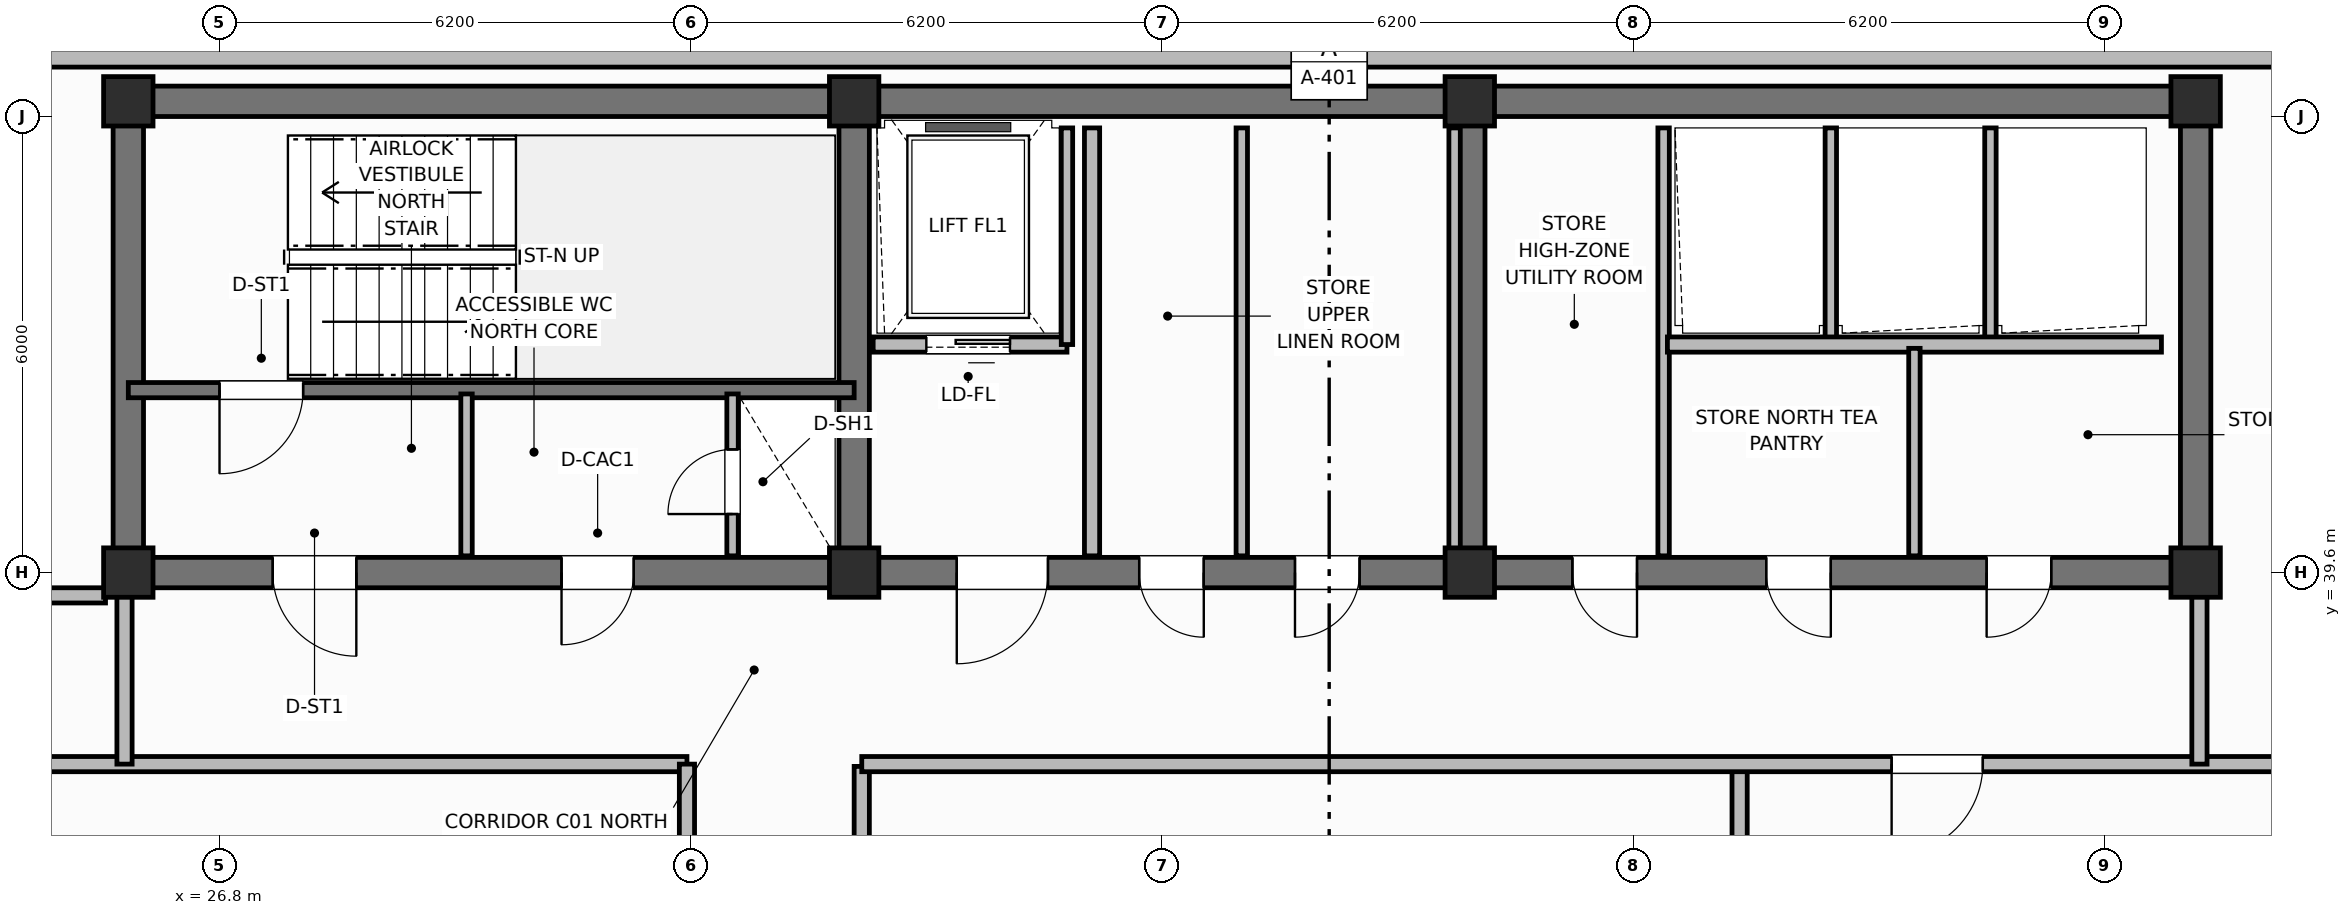
"""IFC4 building model, lengths in metres.
Left out: names, types, materials, properties, quantities, classifications, styles, units other than length and angle.
Written with IfcOpenShell. Run it as: python <this file> out.ifc"""

import sys

from ifc_helpers import new_model, si_unit, direction, frame, frame_2d, origin, origin_2d, place, context, subcontext, project, spatial, rectangle, extrude, element, fill, save


model = new_model("IFC4")
c1 = context("Model", 3, precision=1e-05, world=origin(), true_north=direction((0.0, 1.0)))
c2 = subcontext(c1, "Body", "Model", "MODEL_VIEW")
j1 = project(units=[si_unit("LENGTHUNIT", "METRE"), si_unit("PLANEANGLEUNIT", "RADIAN")], contexts=[c1])
p1 = place(None, origin())
s1 = spatial("IfcSite", under=j1, at=p1, CompositionType="ELEMENT")
p2 = place(p1, origin())
s2 = spatial("IfcBuilding", under=s1, at=p2, CompositionType="ELEMENT")
p3 = place(p2, frame((0.0, 0.0, 302.0)))
s3 = spatial("IfcBuildingStorey", under=s2, at=p3, CompositionType="ELEMENT", Elevation=302.0)
p4 = place(p3, frame((25.6, 45.8, 0.0), z_axis=(0.0, 0.0, 1.0), x_axis=(1.0, 0.0, 0.0)))
e1 = element("IfcWall", 1, at=p4, inside=s3, PredefinedType="SHEAR", context=c2, shape_type="SweptSolid", body=[
    extrude(rectangle(XDim=27.2, YDim=0.4, at=frame_2d((13.6, 0.0))), origin(), (0.0, 0.0, 1.0), 3.6),
])
for number, where, z_axis, x_axis in (
    (2, (25.6, 39.8, 0.0), (0.0, 0.0, 1.0), (0.0, 1.0, 0.0)),
    (3, (52.8, 39.8, 0.0), (0.0, 0.0, 1.0), (0.0, 1.0, 0.0)),
):
    element("IfcWall", number, at=place(p3, frame(where, z_axis=z_axis, x_axis=x_axis)), inside=s3, PredefinedType="SHEAR", context=c2, shape_type="SweptSolid", body=[
        extrude(rectangle(XDim=5.8, YDim=0.4, at=frame_2d((2.9, 0.0))), origin(), (0.0, 0.0, 1.0), 3.6),
    ])
p5 = place(p3, frame((52.8, 39.6, 0.0), z_axis=(0.0, 0.0, 1.0), x_axis=(-1.0, 0.0, 0.0)))
e4 = element("IfcWall", 4, at=p5, inside=s3, PredefinedType="SHEAR", context=c2, shape_type="SweptSolid", body=[
    extrude(rectangle(XDim=27.2, YDim=0.4, at=frame_2d((13.6, 0.0))), origin(), (0.0, 0.0, 1.0), 3.6),
])
p6 = place(p5, frame((24.2, 0.0, 0.0)))
e5 = element("IfcOpeningElement", 5, at=p6, cuts=e4, PredefinedType="OPENING", context=c2, shape_type="SweptSolid", body=[
    extrude(rectangle(XDim=1.1, YDim=2.15, at=frame_2d((0.55, 1.075))), frame((0.0, 0.21, 0.0), z_axis=(0.0, -1.0, 0.0), x_axis=(1.0, 0.0, 0.0)), (0.0, 0.0, 1.0), 0.42),
])
p7 = place(p5, frame((20.55, 0.0, 0.0)))
e6 = element("IfcOpeningElement", 6, at=p7, cuts=e4, PredefinedType="OPENING", context=c2, shape_type="SweptSolid", body=[
    extrude(rectangle(XDim=0.95, YDim=2.1, at=frame_2d((0.475, 1.05))), frame((0.0, 0.21, 0.0), z_axis=(0.0, -1.0, 0.0), x_axis=(1.0, 0.0, 0.0)), (0.0, 0.0, 1.0), 0.42),
])
p8 = place(p5, frame((15.1, 0.0, 0.0)))
e7 = element("IfcOpeningElement", 7, at=p8, cuts=e4, PredefinedType="OPENING", context=c2, shape_type="SweptSolid", body=[
    extrude(rectangle(XDim=1.2, YDim=2.15, at=frame_2d((0.6, 1.075))), frame((0.0, 0.21, 0.0), z_axis=(0.0, -1.0, 0.0), x_axis=(1.0, 0.0, 0.0)), (0.0, 0.0, 1.0), 0.42),
])
p9 = place(p5, frame((13.05, 0.0, 0.0)))
e8 = element("IfcOpeningElement", 8, at=p9, cuts=e4, PredefinedType="OPENING", context=c2, shape_type="SweptSolid", body=[
    extrude(rectangle(XDim=0.85, YDim=2.1, at=frame_2d((0.425, 1.05))), frame((0.0, 0.21, 0.0), z_axis=(0.0, -1.0, 0.0), x_axis=(1.0, 0.0, 0.0)), (0.0, 0.0, 1.0), 0.42),
])
p10 = place(p5, frame((11.0, 0.0, 0.0)))
e9 = element("IfcOpeningElement", 9, at=p10, cuts=e4, PredefinedType="OPENING", context=c2, shape_type="SweptSolid", body=[
    extrude(rectangle(XDim=0.85, YDim=2.1, at=frame_2d((0.425, 1.05))), frame((0.0, 0.21, 0.0), z_axis=(0.0, -1.0, 0.0), x_axis=(1.0, 0.0, 0.0)), (0.0, 0.0, 1.0), 0.42),
])
p11 = place(p5, frame((7.35, 0.0, 0.0)))
e10 = element("IfcOpeningElement", 10, at=p11, cuts=e4, PredefinedType="OPENING", context=c2, shape_type="SweptSolid", body=[
    extrude(rectangle(XDim=0.85, YDim=2.1, at=frame_2d((0.425, 1.05))), frame((0.0, 0.21, 0.0), z_axis=(0.0, -1.0, 0.0), x_axis=(1.0, 0.0, 0.0)), (0.0, 0.0, 1.0), 0.42),
])
p12 = place(p5, frame((4.8, 0.0, 0.0)))
e11 = element("IfcOpeningElement", 11, at=p12, cuts=e4, PredefinedType="OPENING", context=c2, shape_type="SweptSolid", body=[
    extrude(rectangle(XDim=0.85, YDim=2.1, at=frame_2d((0.425, 1.05))), frame((0.0, 0.21, 0.0), z_axis=(0.0, -1.0, 0.0), x_axis=(1.0, 0.0, 0.0)), (0.0, 0.0, 1.0), 0.42),
])
p13 = place(p5, frame((1.9, 0.0, 0.0)))
e12 = element("IfcOpeningElement", 12, at=p13, cuts=e4, PredefinedType="OPENING", context=c2, shape_type="SweptSolid", body=[
    extrude(rectangle(XDim=0.85, YDim=2.1, at=frame_2d((0.425, 1.05))), frame((0.0, 0.21, 0.0), z_axis=(0.0, -1.0, 0.0), x_axis=(1.0, 0.0, 0.0)), (0.0, 0.0, 1.0), 0.42),
])
for number, where, z_axis, x_axis in (
    (13, (35.15, 39.8, 0.0), (0.0, 0.0, 1.0), (0.0, 1.0, 0.0)),
    (14, (43.25, 39.8, 0.0), (0.0, 0.0, 1.0), (0.0, 1.0, 0.0)),
):
    element("IfcWall", number, at=place(p3, frame(where, z_axis=z_axis, x_axis=x_axis)), inside=s3, PredefinedType="SHEAR", context=c2, shape_type="SweptSolid", body=[
        extrude(rectangle(XDim=5.8, YDim=0.4, at=frame_2d((2.9, 0.0))), origin(), (0.0, 0.0, 1.0), 3.6),
    ])
for number, where, z_axis, x_axis in (
    (15, (25.6, 39.6, 0.0), (0.0, 0.0, 1.0), (1.0, 0.0, 0.0)),
    (16, (25.6, 45.8, 0.0), (0.0, 0.0, 1.0), (1.0, 0.0, 0.0)),
    (17, (35.15, 39.6, 0.0), (0.0, 0.0, 1.0), (1.0, 0.0, 0.0)),
    (18, (35.15, 45.8, 0.0), (0.0, 0.0, 1.0), (1.0, 0.0, 0.0)),
    (19, (43.25, 39.6, 0.0), (0.0, 0.0, 1.0), (1.0, 0.0, 0.0)),
    (20, (43.25, 45.8, 0.0), (0.0, 0.0, 1.0), (1.0, 0.0, 0.0)),
    (21, (52.8, 39.6, 0.0), (0.0, 0.0, 1.0), (1.0, 0.0, 0.0)),
    (22, (52.8, 45.8, 0.0), (0.0, 0.0, 1.0), (1.0, 0.0, 0.0)),
):
    element("IfcColumn", number, at=place(p3, frame(where, z_axis=z_axis, x_axis=x_axis)), inside=s3, PredefinedType="COLUMN", context=c2, shape_type="SweptSolid", body=[
        extrude(rectangle(XDim=0.65, YDim=0.65, at=origin_2d()), origin(), (0.0, 0.0, 1.0), 3.6),
    ])
p14 = place(p3, frame((54.64, 46.4, 0.0), z_axis=(0.0, 0.0, 1.0), x_axis=(-1.0, 0.0, 0.0)))
e23 = element("IfcWall", 23, at=p14, inside=s3, PredefinedType="SOLIDWALL", context=c2, shape_type="SweptSolid", body=[
    extrude(rectangle(XDim=30.88, YDim=0.3, at=frame_2d((15.44, 0.0))), origin(), (0.0, 0.0, 1.0), 2.84),
])
p15 = place(p3, frame((35.15, 42.0, 0.0), z_axis=(0.0, 0.0, 1.0), x_axis=(-1.0, 0.0, 0.0)))
e24 = element("IfcWall", 24, at=p15, inside=s3, PredefinedType="SHEAR", context=c2, shape_type="SweptSolid", body=[
    extrude(rectangle(XDim=9.55, YDim=0.2, at=frame_2d((4.775, 0.0))), origin(), (0.0, 0.0, 1.0), 3.6),
])
p16 = place(p15, frame((7.25, 0.0, 0.0)))
e25 = element("IfcOpeningElement", 25, at=p16, cuts=e24, PredefinedType="OPENING", context=c2, shape_type="SweptSolid", body=[
    extrude(rectangle(XDim=1.1, YDim=2.15, at=frame_2d((0.55, 1.075))), frame((0.0, 0.11, 0.0), z_axis=(0.0, -1.0, 0.0), x_axis=(1.0, 0.0, 0.0)), (0.0, 0.0, 1.0), 0.22),
])
p17 = place(p3, frame((33.55, 39.82, 0.0), z_axis=(0.0, 0.0, 1.0), x_axis=(0.0, 1.0, 0.0)))
e26 = element("IfcWall", 26, at=p17, inside=s3, PredefinedType="PARTITIONING", context=c2, shape_type="SweptSolid", body=[
    extrude(rectangle(XDim=2.13, YDim=0.15, at=frame_2d((1.065, 0.0))), origin(), (0.0, 0.0, 1.0), 2.54),
])
p18 = place(p17, frame((0.55, 0.0, 0.0)))
e27 = element("IfcOpeningElement", 27, at=p18, cuts=e26, PredefinedType="OPENING", context=c2, shape_type="SweptSolid", body=[
    extrude(rectangle(XDim=0.85, YDim=2.05, at=frame_2d((0.425, 1.025))), frame((0.0, 0.085, 0.0), z_axis=(0.0, -1.0, 0.0), x_axis=(1.0, 0.0, 0.0)), (0.0, 0.0, 1.0), 0.17),
])
p19 = place(p3, frame((30.05, 39.82, 0.0), z_axis=(0.0, 0.0, 1.0), x_axis=(0.0, 1.0, 0.0)))
e28 = element("IfcWall", 28, at=p19, inside=s3, PredefinedType="PARTITIONING", context=c2, shape_type="SweptSolid", body=[
    extrude(rectangle(XDim=2.13, YDim=0.15, at=frame_2d((1.065, 0.0))), origin(), (0.0, 0.0, 1.0), 2.54),
])
p20 = place(p3, frame((37.95, 42.6, 0.0), z_axis=(0.0, 0.0, 1.0), x_axis=(-1.0, 0.0, 0.0)))
e29 = element("IfcWall", 29, at=p20, inside=s3, PredefinedType="PARTITIONING", context=c2, shape_type="SweptSolid", body=[
    extrude(rectangle(XDim=2.55, YDim=0.2, at=frame_2d((1.275, 0.0))), origin(), (0.0, 0.0, 1.0), 2.2),
])
p21 = place(p20, frame((0.75, 0.0, 0.0)))
e30 = element("IfcOpeningElement", 30, at=p21, cuts=e29, PredefinedType="OPENING", context=c2, shape_type="SweptSolid", body=[
    extrude(rectangle(XDim=1.1, YDim=2.15, at=frame_2d((0.55, 1.075))), frame((0.0, 0.11, 0.0), z_axis=(0.0, -1.0, 0.0), x_axis=(1.0, 0.0, 0.0)), (0.0, 0.0, 1.0), 0.22),
])
p22 = place(p3, frame((37.95, 42.6, 0.0), z_axis=(0.0, 0.0, 1.0), x_axis=(0.0, 1.0, 0.0)))
e31 = element("IfcWall", 31, at=p22, inside=s3, PredefinedType="PARTITIONING", context=c2, shape_type="SweptSolid", body=[
    extrude(rectangle(XDim=2.85, YDim=0.15, at=frame_2d((1.425, 0.0))), origin(), (0.0, 0.0, 1.0), 2.54),
])
p23 = place(p3, frame((38.28, 39.82, 0.0), z_axis=(0.0, 0.0, 1.0), x_axis=(0.0, 1.0, 0.0)))
e32 = element("IfcWall", 32, at=p23, inside=s3, PredefinedType="PARTITIONING", context=c2, shape_type="SweptSolid", body=[
    extrude(rectangle(XDim=5.63, YDim=0.2, at=frame_2d((2.815, 0.0))), origin(), (0.0, 0.0, 1.0), 2.54),
])
for number, where, z_axis, x_axis in (
    (33, (43.05, 39.82, 0.0), (0.0, 0.0, 1.0), (0.0, 1.0, 0.0)),
    (34, (40.25, 39.82, 0.0), (0.0, 0.0, 1.0), (0.0, 1.0, 0.0)),
    (35, (45.8, 39.82, 0.0), (0.0, 0.0, 1.0), (0.0, 1.0, 0.0)),
):
    element("IfcWall", number, at=place(p3, frame(where, z_axis=z_axis, x_axis=x_axis)), inside=s3, PredefinedType="PARTITIONING", context=c2, shape_type="SweptSolid", body=[
        extrude(rectangle(XDim=5.63, YDim=0.15, at=frame_2d((2.815, 0.0))), origin(), (0.0, 0.0, 1.0), 2.54),
    ])
for number, where, z_axis, x_axis in (
    (36, (48.0, 42.65, 0.0), (0.0, 0.0, 1.0), (0.0, 1.0, 0.0)),
    (37, (50.1, 42.65, 0.0), (0.0, 0.0, 1.0), (0.0, 1.0, 0.0)),
):
    element("IfcWall", number, at=place(p3, frame(where, z_axis=z_axis, x_axis=x_axis)), inside=s3, PredefinedType="PARTITIONING", context=c2, shape_type="SweptSolid", body=[
        extrude(rectangle(XDim=2.8, YDim=0.15, at=frame_2d((1.4, 0.0))), origin(), (0.0, 0.0, 1.0), 2.54),
    ])
p24 = place(p3, frame((52.35, 42.6, 0.0), z_axis=(0.0, 0.0, 1.0), x_axis=(-1.0, 0.0, 0.0)))
e38 = element("IfcWall", 38, at=p24, inside=s3, PredefinedType="PARTITIONING", context=c2, shape_type="SweptSolid", body=[
    extrude(rectangle(XDim=6.5, YDim=0.2, at=frame_2d((3.25, 0.0))), origin(), (0.0, 0.0, 1.0), 2.54),
])
p25 = place(p3, frame((49.1, 39.82, 0.0), z_axis=(0.0, 0.0, 1.0), x_axis=(0.0, 1.0, 0.0)))
e39 = element("IfcWall", 39, at=p25, inside=s3, PredefinedType="PARTITIONING", context=c2, shape_type="SweptSolid", body=[
    extrude(rectangle(XDim=2.73, YDim=0.15, at=frame_2d((1.365, 0.0))), origin(), (0.0, 0.0, 1.0), 2.54),
])
p26 = place(p3, frame((21.53, 37.08, 0.0), z_axis=(0.0, 0.0, 1.0), x_axis=(1.0, 0.0, 0.0)))
e40 = element("IfcWall", 40, at=p26, inside=s3, PredefinedType="PARTITIONING", context=c2, shape_type="SweptSolid", body=[
    extrude(rectangle(XDim=11.42, YDim=0.2, at=frame_2d((5.71, 0.0))), origin(), (0.0, 0.0, 1.0), 2.54),
])
p27 = place(p3, frame((32.95, 19.32, 0.0), z_axis=(0.0, 0.0, 1.0), x_axis=(0.0, 1.0, 0.0)))
e41 = element("IfcWall", 41, at=p27, inside=s3, PredefinedType="PARTITIONING", context=c2, shape_type="SweptSolid", body=[
    extrude(rectangle(XDim=17.76, YDim=0.2, at=frame_2d((8.88, 0.0))), origin(), (0.0, 0.0, 1.0), 2.54),
])
p28 = place(p27, frame((6.0, 0.0, 0.0)))
e42 = element("IfcOpeningElement", 42, at=p28, cuts=e41, PredefinedType="OPENING", context=c2, shape_type="SweptSolid", body=[
    extrude(rectangle(XDim=1.2, YDim=2.15, at=frame_2d((0.6, 1.075))), frame((0.0, 0.11, 0.0), z_axis=(0.0, -1.0, 0.0), x_axis=(1.0, 0.0, 0.0)), (0.0, 0.0, 1.0), 0.22),
])
p29 = place(p3, frame((35.25, 19.35, 0.0), z_axis=(0.0, 0.0, 1.0), x_axis=(0.0, 1.0, 0.0)))
e43 = element("IfcWall", 43, at=p29, inside=s3, PredefinedType="PARTITIONING", context=c2, shape_type="SweptSolid", body=[
    extrude(rectangle(XDim=17.7, YDim=0.2, at=frame_2d((8.85, 0.0))), origin(), (0.0, 0.0, 1.0), 2.54),
])
p30 = place(p29, frame((6.0, 0.0, 0.0)))
e44 = element("IfcOpeningElement", 44, at=p30, cuts=e43, PredefinedType="OPENING", context=c2, shape_type="SweptSolid", body=[
    extrude(rectangle(XDim=1.2, YDim=2.15, at=frame_2d((0.6, 1.075))), frame((0.0, 0.11, 0.0), z_axis=(0.0, -1.0, 0.0), x_axis=(1.0, 0.0, 0.0)), (0.0, 0.0, 1.0), 0.22),
])
p31 = place(p3, frame((46.8, 19.35, 0.0), z_axis=(0.0, 0.0, 1.0), x_axis=(0.0, 1.0, 0.0)))
e45 = element("IfcWall", 45, at=p31, inside=s3, PredefinedType="PARTITIONING", context=c2, shape_type="SweptSolid", body=[
    extrude(rectangle(XDim=17.7, YDim=0.2, at=frame_2d((8.85, 0.0))), origin(), (0.0, 0.0, 1.0), 2.54),
])
p32 = place(p3, frame((56.87, 37.08, 0.0), z_axis=(0.0, 0.0, 1.0), x_axis=(-1.0, 0.0, 0.0)))
e46 = element("IfcWall", 46, at=p32, inside=s3, PredefinedType="PARTITIONING", context=c2, shape_type="SweptSolid", body=[
    extrude(rectangle(XDim=21.62, YDim=0.2, at=frame_2d((10.81, 0.0))), origin(), (0.0, 0.0, 1.0), 2.54),
])
p33 = place(p32, frame((6.87, 0.0, 0.0)))
e47 = element("IfcOpeningElement", 47, at=p33, cuts=e46, PredefinedType="OPENING", context=c2, shape_type="SweptSolid", body=[
    extrude(rectangle(XDim=1.2, YDim=2.15, at=frame_2d((0.6, 1.075))), frame((0.0, 0.11, 0.0), z_axis=(0.0, -1.0, 0.0), x_axis=(1.0, 0.0, 0.0)), (0.0, 0.0, 1.0), 0.22),
])
for number, where, z_axis, x_axis in (
    (48, (52.85, 37.08, 0.0), (0.0, 0.0, 1.0), (0.0, 1.0, 0.0)),
    (49, (25.55, 37.08, 0.0), (0.0, 0.0, 1.0), (0.0, 1.0, 0.0)),
):
    element("IfcWall", number, at=place(p3, frame(where, z_axis=z_axis, x_axis=x_axis)), inside=s3, PredefinedType="PARTITIONING", context=c2, shape_type="SweptSolid", body=[
        extrude(rectangle(XDim=2.37, YDim=0.2, at=frame_2d((1.185, 0.0))), origin(), (0.0, 0.0, 1.0), 2.54),
    ])
p34 = place(p3, frame((21.53, 39.3, 0.0), z_axis=(0.0, 0.0, 1.0), x_axis=(1.0, 0.0, 0.0)))
e50 = element("IfcWall", 50, at=p34, inside=s3, PredefinedType="PARTITIONING", context=c2, shape_type="SweptSolid", body=[
    extrude(rectangle(XDim=3.77, YDim=0.2, at=frame_2d((1.885, 0.0))), origin(), (0.0, 0.0, 1.0), 2.54),
])
p35 = place(p16, origin())
e51 = element("IfcDoor", 51, at=p35, inside=s3, OperationType="SINGLE_SWING_RIGHT", PredefinedType="DOOR", context=c2, shape_type="SweptSolid", body=[
    extrude(rectangle(XDim=1.1, YDim=2.15, at=frame_2d((0.55, 1.075))), frame((0.0, 0.025, 0.0), z_axis=(0.0, -1.0, 0.0), x_axis=(1.0, 0.0, 0.0)), (0.0, 0.0, 1.0), 0.05),
])
fill(e25, e51)
p36 = place(p18, origin())
e52 = element("IfcDoor", 52, at=p36, inside=s3, OperationType="SINGLE_SWING_LEFT", PredefinedType="TRAPDOOR", context=c2, shape_type="SweptSolid", body=[
    extrude(rectangle(XDim=0.85, YDim=2.05, at=frame_2d((0.425, 1.025))), frame((0.0, 0.025, 0.0), z_axis=(0.0, -1.0, 0.0), x_axis=(1.0, 0.0, 0.0)), (0.0, 0.0, 1.0), 0.05),
])
fill(e27, e52)
p37 = place(p21, origin())
e53 = element("IfcDoor", 53, at=p37, inside=s3, OperationType="SLIDING_TO_LEFT", PredefinedType="DOOR", context=c2, shape_type="SweptSolid", body=[
    extrude(rectangle(XDim=1.1, YDim=2.15, at=frame_2d((0.55, 1.075))), frame((0.0, 0.025, 0.0), z_axis=(0.0, -1.0, 0.0), x_axis=(1.0, 0.0, 0.0)), (0.0, 0.0, 1.0), 0.05),
])
fill(e30, e53)
p38 = place(p33, origin())
e54 = element("IfcDoor", 54, at=p38, inside=s3, OperationType="SINGLE_SWING_RIGHT", PredefinedType="DOOR", context=c2, shape_type="SweptSolid", body=[
    extrude(rectangle(XDim=1.2, YDim=2.15, at=frame_2d((0.6, 1.075))), frame((0.0, 0.025, 0.0), z_axis=(0.0, -1.0, 0.0), x_axis=(1.0, 0.0, 0.0)), (0.0, 0.0, 1.0), 0.05),
])
fill(e47, e54)
p39 = place(p6, origin())
e55 = element("IfcDoor", 55, at=p39, inside=s3, OperationType="SINGLE_SWING_LEFT", PredefinedType="DOOR", context=c2, shape_type="SweptSolid", body=[
    extrude(rectangle(XDim=1.1, YDim=2.15, at=frame_2d((0.55, 1.075))), frame((0.0, 0.025, 0.0), z_axis=(0.0, -1.0, 0.0), x_axis=(1.0, 0.0, 0.0)), (0.0, 0.0, 1.0), 0.05),
])
fill(e5, e55)
p40 = place(p7, origin())
e56 = element("IfcDoor", 56, at=p40, inside=s3, OperationType="SINGLE_SWING_RIGHT", PredefinedType="DOOR", context=c2, shape_type="SweptSolid", body=[
    extrude(rectangle(XDim=0.95, YDim=2.1, at=frame_2d((0.475, 1.05))), frame((0.0, 0.025, 0.0), z_axis=(0.0, -1.0, 0.0), x_axis=(1.0, 0.0, 0.0)), (0.0, 0.0, 1.0), 0.05),
])
fill(e6, e56)
p41 = place(p8, origin())
e57 = element("IfcDoor", 57, at=p41, inside=s3, OperationType="SINGLE_SWING_RIGHT", PredefinedType="DOOR", context=c2, shape_type="SweptSolid", body=[
    extrude(rectangle(XDim=1.2, YDim=2.15, at=frame_2d((0.6, 1.075))), frame((0.0, 0.025, 0.0), z_axis=(0.0, -1.0, 0.0), x_axis=(1.0, 0.0, 0.0)), (0.0, 0.0, 1.0), 0.05),
])
fill(e7, e57)
p42 = place(p9, origin())
e58 = element("IfcDoor", 58, at=p42, inside=s3, OperationType="SINGLE_SWING_LEFT", PredefinedType="DOOR", context=c2, shape_type="SweptSolid", body=[
    extrude(rectangle(XDim=0.85, YDim=2.1, at=frame_2d((0.425, 1.05))), frame((0.0, 0.025, 0.0), z_axis=(0.0, -1.0, 0.0), x_axis=(1.0, 0.0, 0.0)), (0.0, 0.0, 1.0), 0.05),
])
fill(e8, e58)
p43 = place(p10, origin())
e59 = element("IfcDoor", 59, at=p43, inside=s3, OperationType="SINGLE_SWING_RIGHT", PredefinedType="DOOR", context=c2, shape_type="SweptSolid", body=[
    extrude(rectangle(XDim=0.85, YDim=2.1, at=frame_2d((0.425, 1.05))), frame((0.0, 0.025, 0.0), z_axis=(0.0, -1.0, 0.0), x_axis=(1.0, 0.0, 0.0)), (0.0, 0.0, 1.0), 0.05),
])
fill(e9, e59)
p44 = place(p11, origin())
e60 = element("IfcDoor", 60, at=p44, inside=s3, OperationType="SINGLE_SWING_LEFT", PredefinedType="DOOR", context=c2, shape_type="SweptSolid", body=[
    extrude(rectangle(XDim=0.85, YDim=2.1, at=frame_2d((0.425, 1.05))), frame((0.0, 0.025, 0.0), z_axis=(0.0, -1.0, 0.0), x_axis=(1.0, 0.0, 0.0)), (0.0, 0.0, 1.0), 0.05),
])
fill(e10, e60)
p45 = place(p12, origin())
e61 = element("IfcDoor", 61, at=p45, inside=s3, OperationType="SINGLE_SWING_LEFT", PredefinedType="DOOR", context=c2, shape_type="SweptSolid", body=[
    extrude(rectangle(XDim=0.85, YDim=2.1, at=frame_2d((0.425, 1.05))), frame((0.0, 0.025, 0.0), z_axis=(0.0, -1.0, 0.0), x_axis=(1.0, 0.0, 0.0)), (0.0, 0.0, 1.0), 0.05),
])
fill(e11, e61)
p46 = place(p13, origin())
e62 = element("IfcDoor", 62, at=p46, inside=s3, OperationType="SINGLE_SWING_RIGHT", PredefinedType="DOOR", context=c2, shape_type="SweptSolid", body=[
    extrude(rectangle(XDim=0.85, YDim=2.1, at=frame_2d((0.425, 1.05))), frame((0.0, 0.025, 0.0), z_axis=(0.0, -1.0, 0.0), x_axis=(1.0, 0.0, 0.0)), (0.0, 0.0, 1.0), 0.05),
])
fill(e12, e62)
save(model, sys.argv[1])
